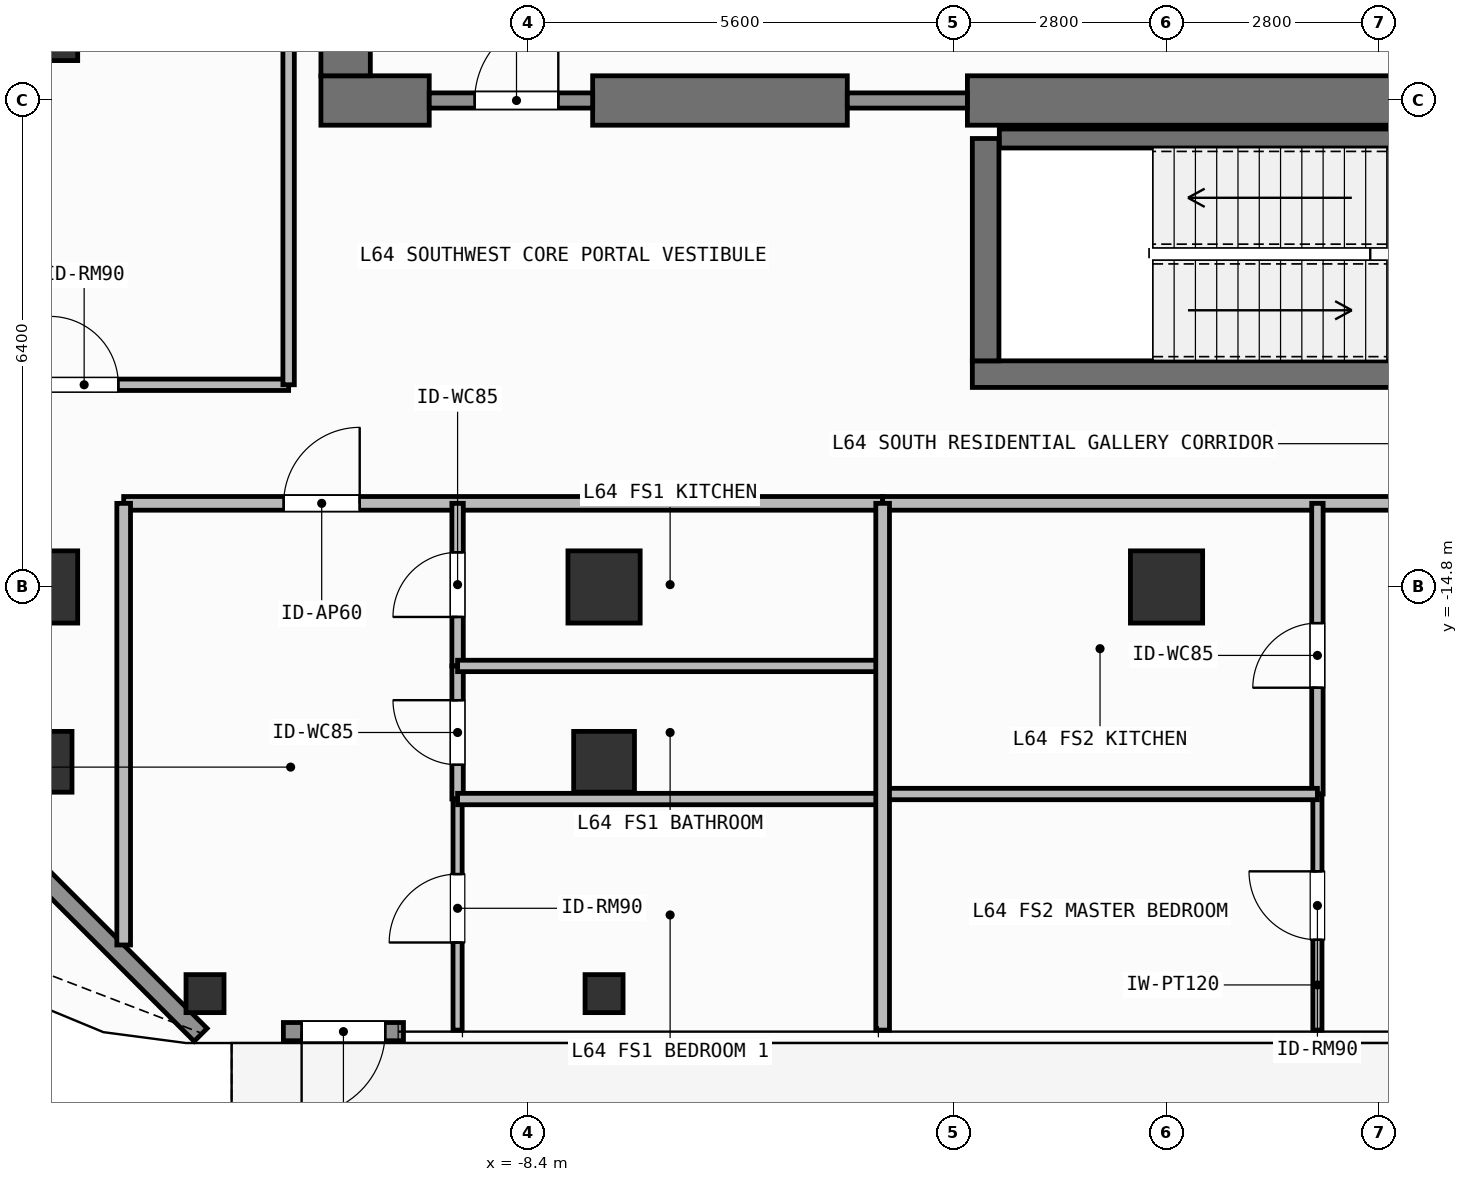
"""IFC4 building model, lengths in metres.
Left out: names, types, materials, properties, quantities, classifications, styles, units other than length and angle.
Written with IfcOpenShell. Run it as: python <this file> out.ifc"""

import sys

from ifc_helpers import new_model, si_unit, direction, frame, frame_2d, origin, origin_2d, place, context, subcontext, project, spatial, rectangle, hollow_rectangle, extrude, element, fill, save


model = new_model("IFC4")
c1 = context("Model", 3, precision=1e-05, world=origin(), true_north=direction((0.0, 1.0)))
c2 = subcontext(c1, "Body", "Model", "MODEL_VIEW")
j1 = project(units=[si_unit("LENGTHUNIT", "METRE"), si_unit("PLANEANGLEUNIT", "RADIAN")], contexts=[c1])
p1 = place(None, origin())
s1 = spatial("IfcSite", under=j1, at=p1, CompositionType="ELEMENT")
p2 = place(p1, origin())
s2 = spatial("IfcBuilding", under=s1, at=p2, CompositionType="ELEMENT")
p3 = place(p2, frame((0.0, 0.0, 262.5)))
s3 = spatial("IfcBuildingStorey", under=s2, at=p3, CompositionType="ELEMENT", Elevation=262.5)
p4 = place(p3, frame((-11.125, -8.4, 0.0), z_axis=(0.0, 0.0, 1.0), x_axis=(1.0, 0.0, 0.0)))
e1 = element("IfcWall", 1, at=p4, inside=s3, PredefinedType="SHEAR", context=c2, shape_type="SweptSolid", body=[
    extrude(rectangle(XDim=1.425, YDim=0.65, at=frame_2d((0.712, 0.0))), origin(), (0.0, 0.0, 1.0), 3.9),
])
p5 = place(p3, frame((-7.55, -8.4, 0.0), z_axis=(0.0, 0.0, 1.0), x_axis=(1.0, 0.0, 0.0)))
e2 = element("IfcWall", 2, at=p5, inside=s3, PredefinedType="SHEAR", context=c2, shape_type="SweptSolid", body=[
    extrude(rectangle(XDim=3.35, YDim=0.65, at=frame_2d((1.675, 0.0))), origin(), (0.0, 0.0, 1.0), 3.9),
])
p6 = place(p3, frame((-2.62, -8.4, 0.0), z_axis=(0.0, 0.0, 1.0), x_axis=(1.0, 0.0, 0.0)))
e3 = element("IfcWall", 3, at=p6, inside=s3, PredefinedType="SHEAR", context=c2, shape_type="SweptSolid", body=[
    extrude(rectangle(XDim=7.27, YDim=0.65, at=frame_2d((3.635, 0.0))), origin(), (0.0, 0.0, 1.0), 3.9),
])
p7 = place(p3, frame((-10.8, -8.075, 0.0), z_axis=(0.0, 0.0, 1.0), x_axis=(0.0, 1.0, 0.0)))
e4 = element("IfcWall", 4, at=p7, inside=s3, PredefinedType="SHEAR", context=c2, shape_type="SweptSolid", body=[
    extrude(rectangle(XDim=16.15, YDim=0.65, at=frame_2d((8.075, 0.0))), origin(), (0.0, 0.0, 1.0), 3.9),
])
p8 = place(p3, frame((-2.555, -12.0, 0.0), z_axis=(0.0, 0.0, 1.0), x_axis=(1.0, 0.0, 0.0)))
e5 = element("IfcWall", 5, at=p8, inside=s3, PredefinedType="SHEAR", context=c2, shape_type="SweptSolid", body=[
    extrude(rectangle(XDim=7.31, YDim=0.35, at=frame_2d((3.655, 0.0))), origin(), (0.0, 0.0, 1.0), 3.9),
])
p9 = place(p3, frame((-2.2, -8.9, 0.0), z_axis=(0.0, 0.0, 1.0), x_axis=(1.0, 0.0, 0.0)))
e6 = element("IfcWall", 6, at=p9, inside=s3, PredefinedType="SHEAR", context=c2, shape_type="SweptSolid", body=[
    extrude(rectangle(XDim=6.6, YDim=0.25, at=frame_2d((3.3, 0.0))), origin(), (0.0, 0.0, 1.0), 3.9),
])
p10 = place(p3, frame((-2.38, -11.825, 0.0), z_axis=(0.0, 0.0, 1.0), x_axis=(0.0, 1.0, 0.0)))
e7 = element("IfcWall", 7, at=p10, inside=s3, PredefinedType="SHEAR", context=c2, shape_type="SweptSolid", body=[
    extrude(rectangle(XDim=2.925, YDim=0.35, at=frame_2d((1.462, 0.0))), origin(), (0.0, 0.0, 1.0), 3.9),
])
for number, where, z_axis, x_axis in (
    (8, (-14.8, -14.8, 0.0), (0.0, 0.0, 1.0), (1.0, 0.0, 0.0)),
    (9, (-7.4, -14.8, 0.0), (0.0, 0.0, 1.0), (1.0, 0.0, 0.0)),
    (10, (0.0, -14.8, 0.0), (0.0, 0.0, 1.0), (1.0, 0.0, 0.0)),
    (11, (-14.8, -7.4, 0.0), (0.0, 0.0, 1.0), (1.0, 0.0, 0.0)),
):
    element("IfcColumn", number, at=place(p3, frame(where, z_axis=z_axis, x_axis=x_axis)), inside=s3, PredefinedType="COLUMN", context=c2, shape_type="SweptSolid", body=[
        extrude(rectangle(XDim=0.95, YDim=0.95, at=origin_2d()), origin(), (0.0, 0.0, 1.0), 3.9),
    ])
for number, where, z_axis, x_axis in (
    (12, (-14.8, -17.1, 0.0), (0.0, 0.0, 1.0), (1.0, 0.0, 0.0)),
    (13, (-7.4, -17.1, 0.0), (0.0, 0.0, 1.0), (1.0, 0.0, 0.0)),
):
    element("IfcColumn", number, at=place(p3, frame(where, z_axis=z_axis, x_axis=x_axis)), inside=s3, PredefinedType="COLUMN", context=c2, shape_type="SweptSolid", body=[
        extrude(hollow_rectangle(XDim=0.8, YDim=0.8, WallThickness=0.036, at=origin_2d()), origin(), (0.0, 0.0, 1.0), 3.9),
    ])
for number, where, z_axis, x_axis in (
    (14, (-12.65, -20.15, 0.0), (0.0, 0.0, 1.0), (1.0, 0.0, 0.0)),
    (15, (-7.4, -20.15, 0.0), (0.0, 0.0, 1.0), (1.0, 0.0, 0.0)),
):
    element("IfcColumn", number, at=place(p3, frame(where, z_axis=z_axis, x_axis=x_axis)), inside=s3, PredefinedType="COLUMN", context=c2, shape_type="SweptSolid", body=[
        extrude(hollow_rectangle(XDim=0.5, YDim=0.5, WallThickness=0.025, at=origin_2d()), origin(), (0.0, 0.0, 1.0), 3.9),
    ])
p11 = place(p3, frame((-10.039, -20.65, 0.0), z_axis=(0.0, 0.0, 1.0), x_axis=(-1.0, 0.0, 0.0)))
e16 = element("IfcWall", 16, at=p11, inside=s3, PredefinedType="SOLIDWALL", context=c2, shape_type="SweptSolid", body=[
    extrude(rectangle(XDim=1.58, YDim=0.24, at=frame_2d((0.79, 0.0))), origin(), (0.0, 0.0, 1.0), 3.68),
])
p12 = place(p11, frame((0.24, 0.0, 0.0)))
e17 = element("IfcOpeningElement", 17, at=p12, cuts=e16, PredefinedType="OPENING", context=c2, shape_type="SweptSolid", body=[
    extrude(rectangle(XDim=1.1, YDim=2.2, at=frame_2d((0.55, 1.1))), frame((0.0, 0.13, 0.0), z_axis=(0.0, -1.0, 0.0), x_axis=(1.0, 0.0, 0.0)), (0.0, 0.0, 1.0), 0.26),
])
p13 = place(p3, frame((-12.708, -20.692, 0.0), z_axis=(0.0, 0.0, 1.0), x_axis=(-0.707126925818, 0.707086635981, 0.0)))
e18 = element("IfcWall", 18, at=p13, inside=s3, PredefinedType="SOLIDWALL", context=c2, shape_type="SweptSolid", body=[
    extrude(rectangle(XDim=6.06, YDim=0.24, at=frame_2d((3.03, 0.0))), origin(), (0.0, 0.0, 1.0), 3.68),
])
p14 = place(p3, frame((-9.7, -8.4, 0.0), z_axis=(0.0, 0.0, 1.0), x_axis=(1.0, 0.0, 0.0)))
e19 = element("IfcWall", 19, at=p14, inside=s3, PredefinedType="SOLIDWALL", context=c2, shape_type="SweptSolid", body=[
    extrude(rectangle(XDim=2.15, YDim=0.2, at=frame_2d((1.075, 0.0))), origin(), (0.0, 0.0, 1.0), 2.92),
])
p15 = place(p14, frame((0.598, 0.0, 0.0)))
e20 = element("IfcOpeningElement", 20, at=p15, cuts=e19, PredefinedType="OPENING", context=c2, shape_type="SweptSolid", body=[
    extrude(rectangle(XDim=1.1, YDim=2.15, at=frame_2d((0.55, 1.075))), frame((0.0, 0.11, 0.0), z_axis=(0.0, -1.0, 0.0), x_axis=(1.0, 0.0, 0.0)), (0.0, 0.0, 1.0), 0.22),
])
p16 = place(p3, frame((-13.72, -13.7, 0.0), z_axis=(0.0, 0.0, 1.0), x_axis=(1.0, 0.0, 0.0)))
e21 = element("IfcWall", 21, at=p16, inside=s3, PredefinedType="PARTITIONING", context=c2, shape_type="SweptSolid", body=[
    extrude(rectangle(XDim=9.985, YDim=0.18, at=frame_2d((4.992, 0.0))), origin(), (0.0, 0.0, 1.0), 3.68),
])
p17 = place(p16, frame((2.105, 0.0, 0.0)))
e22 = element("IfcOpeningElement", 22, at=p17, cuts=e21, PredefinedType="OPENING", context=c2, shape_type="SweptSolid", body=[
    extrude(rectangle(XDim=1.0, YDim=2.2, at=frame_2d((0.5, 1.1))), frame((0.0, 0.1, 0.0), z_axis=(0.0, -1.0, 0.0), x_axis=(1.0, 0.0, 0.0)), (0.0, 0.0, 1.0), 0.2),
])
p18 = place(p3, frame((-9.327, -15.839, 0.0), z_axis=(0.0, 0.0, 1.0), x_axis=(0.0, 1.0, 0.0)))
e23 = element("IfcWall", 23, at=p18, inside=s3, PredefinedType="PARTITIONING", context=c2, shape_type="SweptSolid", body=[
    extrude(rectangle(XDim=2.139, YDim=0.15, at=frame_2d((1.07, 0.0))), origin(), (0.0, 0.0, 1.0), 3.68),
])
p19 = place(p18, frame((0.645, 0.0, 0.0)))
e24 = element("IfcOpeningElement", 24, at=p19, cuts=e23, PredefinedType="OPENING", context=c2, shape_type="SweptSolid", body=[
    extrude(rectangle(XDim=0.85, YDim=2.1, at=frame_2d((0.425, 1.05))), frame((0.0, 0.085, 0.0), z_axis=(0.0, -1.0, 0.0), x_axis=(1.0, 0.0, 0.0)), (0.0, 0.0, 1.0), 0.17),
])
p20 = place(p3, frame((-9.327, -17.59, 0.0), z_axis=(0.0, 0.0, 1.0), x_axis=(0.0, 1.0, 0.0)))
e25 = element("IfcWall", 25, at=p20, inside=s3, PredefinedType="PARTITIONING", context=c2, shape_type="SweptSolid", body=[
    extrude(rectangle(XDim=1.751, YDim=0.15, at=frame_2d((0.875, 0.0))), origin(), (0.0, 0.0, 1.0), 3.68),
])
p21 = place(p20, frame((0.45, 0.0, 0.0)))
e26 = element("IfcOpeningElement", 26, at=p21, cuts=e25, PredefinedType="OPENING", context=c2, shape_type="SweptSolid", body=[
    extrude(rectangle(XDim=0.85, YDim=2.1, at=frame_2d((0.425, 1.05))), frame((0.0, 0.085, 0.0), z_axis=(0.0, -1.0, 0.0), x_axis=(1.0, 0.0, 0.0)), (0.0, 0.0, 1.0), 0.17),
])
p22 = place(p3, frame((-9.327, -20.63, 0.0), z_axis=(0.0, 0.0, 1.0), x_axis=(0.0, 1.0, 0.0)))
e27 = element("IfcWall", 27, at=p22, inside=s3, PredefinedType="PARTITIONING", context=c2, shape_type="SweptSolid", body=[
    extrude(rectangle(XDim=3.04, YDim=0.12, at=frame_2d((1.52, 0.0))), origin(), (0.0, 0.0, 1.0), 3.68),
])
p23 = place(p22, frame((1.153, 0.0, 0.0)))
e28 = element("IfcOpeningElement", 28, at=p23, cuts=e27, PredefinedType="OPENING", context=c2, shape_type="SweptSolid", body=[
    extrude(rectangle(XDim=0.9, YDim=2.1, at=frame_2d((0.45, 1.05))), frame((0.0, 0.07, 0.0), z_axis=(0.0, -1.0, 0.0), x_axis=(1.0, 0.0, 0.0)), (0.0, 0.0, 1.0), 0.14),
])
p24 = place(p3, frame((-3.735, -13.7, 0.0), z_axis=(0.0, 0.0, 1.0), x_axis=(1.0, 0.0, 0.0)))
e29 = element("IfcWall", 29, at=p24, inside=s3, PredefinedType="PARTITIONING", context=c2, shape_type="SweptSolid", body=[
    extrude(rectangle(XDim=14.301, YDim=0.18, at=frame_2d((7.15, 0.0))), origin(), (0.0, 0.0, 1.0), 3.68),
])
p25 = place(p24, frame((6.917, 0.0, 0.0)))
e30 = element("IfcOpeningElement", 30, at=p25, cuts=e29, PredefinedType="OPENING", context=c2, shape_type="SweptSolid", body=[
    extrude(rectangle(XDim=1.0, YDim=2.2, at=frame_2d((0.5, 1.1))), frame((0.0, 0.1, 0.0), z_axis=(0.0, -1.0, 0.0), x_axis=(1.0, 0.0, 0.0)), (0.0, 0.0, 1.0), 0.2),
])
p26 = place(p3, frame((1.985, -17.524, 0.0), z_axis=(0.0, 0.0, 1.0), x_axis=(0.0, 1.0, 0.0)))
e31 = element("IfcWall", 31, at=p26, inside=s3, PredefinedType="PARTITIONING", context=c2, shape_type="SweptSolid", body=[
    extrude(rectangle(XDim=3.824, YDim=0.15, at=frame_2d((1.912, 0.0))), origin(), (0.0, 0.0, 1.0), 3.68),
])
p27 = place(p26, frame((1.398, 0.0, 0.0)))
e32 = element("IfcOpeningElement", 32, at=p27, cuts=e31, PredefinedType="OPENING", context=c2, shape_type="SweptSolid", body=[
    extrude(rectangle(XDim=0.85, YDim=2.1, at=frame_2d((0.425, 1.05))), frame((0.0, 0.085, 0.0), z_axis=(0.0, -1.0, 0.0), x_axis=(1.0, 0.0, 0.0)), (0.0, 0.0, 1.0), 0.17),
])
p28 = place(p3, frame((1.985, -20.63, 0.0), z_axis=(0.0, 0.0, 1.0), x_axis=(0.0, 1.0, 0.0)))
e33 = element("IfcWall", 33, at=p28, inside=s3, PredefinedType="PARTITIONING", context=c2, shape_type="SweptSolid", body=[
    extrude(rectangle(XDim=3.106, YDim=0.12, at=frame_2d((1.553, 0.0))), origin(), (0.0, 0.0, 1.0), 3.68),
])
p29 = place(p28, frame((1.189, 0.0, 0.0)))
e34 = element("IfcOpeningElement", 34, at=p29, cuts=e33, PredefinedType="OPENING", context=c2, shape_type="SweptSolid", body=[
    extrude(rectangle(XDim=0.9, YDim=2.1, at=frame_2d((0.45, 1.05))), frame((0.0, 0.07, 0.0), z_axis=(0.0, -1.0, 0.0), x_axis=(1.0, 0.0, 0.0)), (0.0, 0.0, 1.0), 0.14),
])
p30 = place(p3, frame((-16.93, -12.14, 0.0), z_axis=(0.0, 0.0, 1.0), x_axis=(1.0, 0.0, 0.0)))
e35 = element("IfcWall", 35, at=p30, inside=s3, PredefinedType="PARTITIONING", context=c2, shape_type="SweptSolid", body=[
    extrude(rectangle(XDim=5.38, YDim=0.15, at=frame_2d((2.69, 0.0))), origin(), (0.0, 0.0, 1.0), 3.68),
])
p31 = place(p30, frame((2.24, 0.0, 0.0)))
e36 = element("IfcOpeningElement", 36, at=p31, cuts=e35, PredefinedType="OPENING", context=c2, shape_type="SweptSolid", body=[
    extrude(rectangle(XDim=0.9, YDim=2.1, at=frame_2d((0.45, 1.05))), frame((0.0, 0.085, 0.0), z_axis=(0.0, -1.0, 0.0), x_axis=(1.0, 0.0, 0.0)), (0.0, 0.0, 1.0), 0.17),
])
p32 = place(p3, frame((-4.2, -8.4, 0.0), z_axis=(0.0, 0.0, 1.0), x_axis=(1.0, 0.0, 0.0)))
e37 = element("IfcWall", 37, at=p32, inside=s3, PredefinedType="SOLIDWALL", context=c2, shape_type="SweptSolid", body=[
    extrude(rectangle(XDim=1.58, YDim=0.2, at=frame_2d((0.79, 0.0))), origin(), (0.0, 0.0, 1.0), 2.92),
])
p33 = place(p3, frame((-13.72, -19.51, 0.0), z_axis=(0.0, 0.0, 1.0), x_axis=(0.0, 1.0, 0.0)))
e38 = element("IfcWall", 38, at=p33, inside=s3, PredefinedType="PARTITIONING", context=c2, shape_type="SweptSolid", body=[
    extrude(rectangle(XDim=5.81, YDim=0.18, at=frame_2d((2.905, 0.0))), origin(), (0.0, 0.0, 1.0), 3.68),
])
for number, where, z_axis, x_axis in (
    (39, (-9.327, -15.839, 0.0), (0.0, 0.0, 1.0), (1.0, 0.0, 0.0)),
    (40, (-9.327, -17.59, 0.0), (0.0, 0.0, 1.0), (1.0, 0.0, 0.0)),
):
    element("IfcWall", number, at=place(p3, frame(where, z_axis=z_axis, x_axis=x_axis)), inside=s3, PredefinedType="PARTITIONING", context=c2, shape_type="SweptSolid", body=[
        extrude(rectangle(XDim=5.592, YDim=0.15, at=frame_2d((2.796, 0.0))), origin(), (0.0, 0.0, 1.0), 3.68),
    ])
p34 = place(p3, frame((-3.735, -17.524, 0.0), z_axis=(0.0, 0.0, 1.0), x_axis=(1.0, 0.0, 0.0)))
e41 = element("IfcWall", 41, at=p34, inside=s3, PredefinedType="PARTITIONING", context=c2, shape_type="SweptSolid", body=[
    extrude(rectangle(XDim=5.72, YDim=0.15, at=frame_2d((2.86, 0.0))), origin(), (0.0, 0.0, 1.0), 3.68),
])
p35 = place(p3, frame((-3.735, -20.63, 0.0), z_axis=(0.0, 0.0, 1.0), x_axis=(0.0, 1.0, 0.0)))
e42 = element("IfcWall", 42, at=p35, inside=s3, PredefinedType="PARTITIONING", context=c2, shape_type="SweptSolid", body=[
    extrude(rectangle(XDim=6.93, YDim=0.18, at=frame_2d((3.465, 0.0))), origin(), (0.0, 0.0, 1.0), 3.68),
])
p36 = place(p3, frame((-11.55, -12.14, 0.0), z_axis=(0.0, 0.0, 1.0), x_axis=(0.0, 1.0, 0.0)))
e43 = element("IfcWall", 43, at=p36, inside=s3, PredefinedType="PARTITIONING", context=c2, shape_type="SweptSolid", body=[
    extrude(rectangle(XDim=15.09, YDim=0.15, at=frame_2d((7.545, 0.0))), origin(), (0.0, 0.0, 1.0), 3.68),
])
p37 = place(p12, origin())
e44 = element("IfcDoor", 44, at=p37, inside=s3, OperationType="SINGLE_SWING_RIGHT", PredefinedType="DOOR", context=c2, shape_type="SweptSolid", body=[
    extrude(rectangle(XDim=1.1, YDim=2.2, at=frame_2d((0.55, 1.1))), frame((0.0, 0.025, 0.0), z_axis=(0.0, -1.0, 0.0), x_axis=(1.0, 0.0, 0.0)), (0.0, 0.0, 1.0), 0.05),
])
fill(e17, e44)
p38 = place(p15, origin())
e45 = element("IfcDoor", 45, at=p38, inside=s3, OperationType="SINGLE_SWING_RIGHT", PredefinedType="DOOR", context=c2, shape_type="SweptSolid", body=[
    extrude(rectangle(XDim=1.1, YDim=2.15, at=frame_2d((0.55, 1.075))), frame((0.0, 0.025, 0.0), z_axis=(0.0, -1.0, 0.0), x_axis=(1.0, 0.0, 0.0)), (0.0, 0.0, 1.0), 0.05),
])
fill(e20, e45)
p39 = place(p17, origin())
e46 = element("IfcDoor", 46, at=p39, inside=s3, OperationType="SINGLE_SWING_RIGHT", PredefinedType="DOOR", context=c2, shape_type="SweptSolid", body=[
    extrude(rectangle(XDim=1.0, YDim=2.2, at=frame_2d((0.5, 1.1))), frame((0.0, 0.025, 0.0), z_axis=(0.0, -1.0, 0.0), x_axis=(1.0, 0.0, 0.0)), (0.0, 0.0, 1.0), 0.05),
])
fill(e22, e46)
p40 = place(p19, origin())
e47 = element("IfcDoor", 47, at=p40, inside=s3, OperationType="SINGLE_SWING_LEFT", PredefinedType="DOOR", context=c2, shape_type="SweptSolid", body=[
    extrude(rectangle(XDim=0.85, YDim=2.1, at=frame_2d((0.425, 1.05))), frame((0.0, 0.025, 0.0), z_axis=(0.0, -1.0, 0.0), x_axis=(1.0, 0.0, 0.0)), (0.0, 0.0, 1.0), 0.05),
])
fill(e24, e47)
p41 = place(p21, origin())
e48 = element("IfcDoor", 48, at=p41, inside=s3, OperationType="SINGLE_SWING_RIGHT", PredefinedType="DOOR", context=c2, shape_type="SweptSolid", body=[
    extrude(rectangle(XDim=0.85, YDim=2.1, at=frame_2d((0.425, 1.05))), frame((0.0, 0.025, 0.0), z_axis=(0.0, -1.0, 0.0), x_axis=(1.0, 0.0, 0.0)), (0.0, 0.0, 1.0), 0.05),
])
fill(e26, e48)
p42 = place(p23, origin())
e49 = element("IfcDoor", 49, at=p42, inside=s3, OperationType="SINGLE_SWING_LEFT", PredefinedType="DOOR", context=c2, shape_type="SweptSolid", body=[
    extrude(rectangle(XDim=0.9, YDim=2.1, at=frame_2d((0.45, 1.05))), frame((0.0, 0.025, 0.0), z_axis=(0.0, -1.0, 0.0), x_axis=(1.0, 0.0, 0.0)), (0.0, 0.0, 1.0), 0.05),
])
fill(e28, e49)
p43 = place(p27, origin())
e50 = element("IfcDoor", 50, at=p43, inside=s3, OperationType="SINGLE_SWING_LEFT", PredefinedType="DOOR", context=c2, shape_type="SweptSolid", body=[
    extrude(rectangle(XDim=0.85, YDim=2.1, at=frame_2d((0.425, 1.05))), frame((0.0, 0.025, 0.0), z_axis=(0.0, -1.0, 0.0), x_axis=(1.0, 0.0, 0.0)), (0.0, 0.0, 1.0), 0.05),
])
fill(e32, e50)
p44 = place(p29, origin())
e51 = element("IfcDoor", 51, at=p44, inside=s3, OperationType="SINGLE_SWING_RIGHT", PredefinedType="DOOR", context=c2, shape_type="SweptSolid", body=[
    extrude(rectangle(XDim=0.9, YDim=2.1, at=frame_2d((0.45, 1.05))), frame((0.0, 0.025, 0.0), z_axis=(0.0, -1.0, 0.0), x_axis=(1.0, 0.0, 0.0)), (0.0, 0.0, 1.0), 0.05),
])
fill(e34, e51)
p45 = place(p31, origin())
e52 = element("IfcDoor", 52, at=p45, inside=s3, OperationType="SINGLE_SWING_LEFT", PredefinedType="DOOR", context=c2, shape_type="SweptSolid", body=[
    extrude(rectangle(XDim=0.9, YDim=2.1, at=frame_2d((0.45, 1.05))), frame((0.0, 0.025, 0.0), z_axis=(0.0, -1.0, 0.0), x_axis=(1.0, 0.0, 0.0)), (0.0, 0.0, 1.0), 0.05),
])
fill(e36, e52)
save(model, sys.argv[1])
